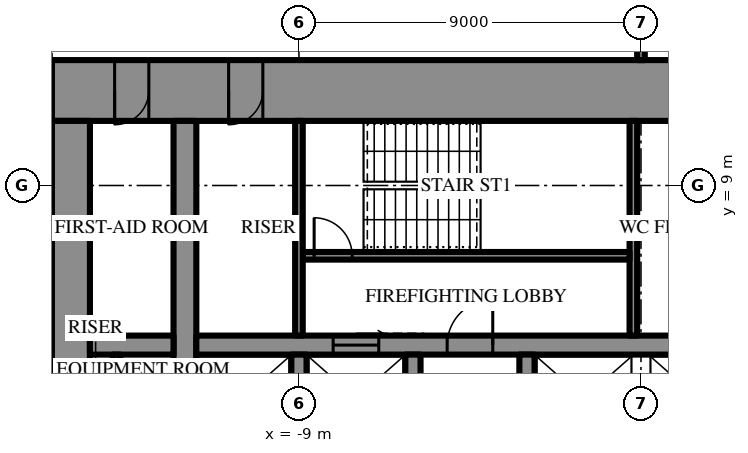
"""IFC4 building model, lengths in metres.
Left out: names, types, materials, properties, quantities, classifications, styles, units other than length and angle.
Written with IfcOpenShell. Run it as: python <this file> out.ifc"""

import sys

from ifc_helpers import new_model, si_unit, direction, frame, frame_2d, origin, place, context, subcontext, project, spatial, rectangle, extrude, element, fill, save


model = new_model("IFC4")
c1 = context("Model", 3, precision=1e-05, world=origin(), true_north=direction((0.0, 1.0)))
c2 = subcontext(c1, "Body", "Model", "MODEL_VIEW")
j1 = project(units=[si_unit("LENGTHUNIT", "METRE"), si_unit("PLANEANGLEUNIT", "RADIAN")], contexts=[c1])
p1 = place(None, origin())
s1 = spatial("IfcSite", under=j1, at=p1, CompositionType="ELEMENT")
p2 = place(p1, origin())
s2 = spatial("IfcBuilding", under=s1, at=p2, CompositionType="ELEMENT")
p3 = place(p2, frame((0.0, 0.0, 265.9)))
s3 = spatial("IfcBuildingStorey", under=s2, at=p3, CompositionType="ELEMENT", Elevation=265.9)
p4 = place(p3, frame((-15.5, 11.5, 0.0), z_axis=(0.0, 0.0, 1.0), x_axis=(1.0, 0.0, 0.0)))
e1 = element("IfcWall", 1, at=p4, inside=s3, PredefinedType="SHEAR", context=c2, shape_type="SweptSolid", body=[
    extrude(rectangle(XDim=31.0, YDim=1.6, at=frame_2d((15.5, 0.0))), origin(), (0.0, 0.0, 1.0), 4.2),
])
p5 = place(p4, frame((16.35, 0.0, 0.0)))
e2 = element("IfcOpeningElement", 2, at=p5, cuts=e1, PredefinedType="OPENING", context=c2, shape_type="SweptSolid", body=[
    extrude(rectangle(XDim=0.9, YDim=2.2, at=frame_2d((0.45, 1.1))), frame((0.0, 0.81, 0.0), z_axis=(0.0, -1.0, 0.0), x_axis=(1.0, 0.0, 0.0)), (0.0, 0.0, 1.0), 1.62),
])
p6 = place(p4, frame((19.35, 0.0, 0.0)))
e3 = element("IfcOpeningElement", 3, at=p6, cuts=e1, PredefinedType="OPENING", context=c2, shape_type="SweptSolid", body=[
    extrude(rectangle(XDim=0.9, YDim=2.2, at=frame_2d((0.45, 1.1))), frame((0.0, 0.81, 0.0), z_axis=(0.0, -1.0, 0.0), x_axis=(1.0, 0.0, 0.0)), (0.0, 0.0, 1.0), 1.62),
])
p7 = place(p4, frame((22.4, 0.0, 0.0)))
e4 = element("IfcOpeningElement", 4, at=p7, cuts=e1, PredefinedType="OPENING", context=c2, shape_type="SweptSolid", body=[
    extrude(rectangle(XDim=1.0, YDim=2.2, at=frame_2d((0.5, 1.1))), frame((0.0, 0.81, 0.0), z_axis=(0.0, -1.0, 0.0), x_axis=(1.0, 0.0, 0.0)), (0.0, 0.0, 1.0), 1.62),
])
p8 = place(p4, frame((1.65, 0.0, 0.0)))
e5 = element("IfcOpeningElement", 5, at=p8, cuts=e1, PredefinedType="OPENING", context=c2, shape_type="SweptSolid", body=[
    extrude(rectangle(XDim=0.9, YDim=2.2, at=frame_2d((0.45, 1.1))), frame((0.0, 0.81, 0.0), z_axis=(0.0, -1.0, 0.0), x_axis=(1.0, 0.0, 0.0)), (0.0, 0.0, 1.0), 1.62),
])
p9 = place(p4, frame((4.65, 0.0, 0.0)))
e6 = element("IfcOpeningElement", 6, at=p9, cuts=e1, PredefinedType="OPENING", context=c2, shape_type="SweptSolid", body=[
    extrude(rectangle(XDim=0.9, YDim=2.2, at=frame_2d((0.45, 1.1))), frame((0.0, 0.81, 0.0), z_axis=(0.0, -1.0, 0.0), x_axis=(1.0, 0.0, 0.0)), (0.0, 0.0, 1.0), 1.62),
])
p10 = place(p4, frame((25.45, 0.0, 0.0)))
e7 = element("IfcOpeningElement", 7, at=p10, cuts=e1, PredefinedType="OPENING", context=c2, shape_type="SweptSolid", body=[
    extrude(rectangle(XDim=0.9, YDim=2.2, at=frame_2d((0.45, 1.1))), frame((0.0, 0.81, 0.0), z_axis=(0.0, -1.0, 0.0), x_axis=(1.0, 0.0, 0.0)), (0.0, 0.0, 1.0), 1.62),
])
p11 = place(p4, frame((28.45, 0.0, 0.0)))
e8 = element("IfcOpeningElement", 8, at=p11, cuts=e1, PredefinedType="OPENING", context=c2, shape_type="SweptSolid", body=[
    extrude(rectangle(XDim=0.9, YDim=2.2, at=frame_2d((0.45, 1.1))), frame((0.0, 0.81, 0.0), z_axis=(0.0, -1.0, 0.0), x_axis=(1.0, 0.0, 0.0)), (0.0, 0.0, 1.0), 1.62),
])
p12 = place(p3, frame((-15.0, 10.7, 0.0), z_axis=(0.0, 0.0, 1.0), x_axis=(0.0, -1.0, 0.0)))
e9 = element("IfcWall", 9, at=p12, inside=s3, PredefinedType="SHEAR", context=c2, shape_type="SweptSolid", body=[
    extrude(rectangle(XDim=21.4, YDim=1.0, at=frame_2d((10.7, 0.0))), origin(), (0.0, 0.0, 1.0), 4.2),
])
p13 = place(p12, frame((9.8, 0.0, 0.0)))
e10 = element("IfcOpeningElement", 10, at=p13, cuts=e9, PredefinedType="OPENING", context=c2, shape_type="SweptSolid", body=[
    extrude(rectangle(XDim=1.8, YDim=2.4, at=frame_2d((0.9, 1.2))), frame((0.0, 0.51, 0.0), z_axis=(0.0, -1.0, 0.0), x_axis=(1.0, 0.0, 0.0)), (0.0, 0.0, 1.0), 1.02),
])
p14 = place(p3, frame((-12.0, -10.7, 0.0), z_axis=(0.0, 0.0, 1.0), x_axis=(0.0, 1.0, 0.0)))
e11 = element("IfcWall", 11, at=p14, inside=s3, PredefinedType="SHEAR", context=c2, shape_type="SweptSolid", body=[
    extrude(rectangle(XDim=21.4, YDim=0.6, at=frame_2d((10.7, 0.0))), origin(), (0.0, 0.0, 1.0), 4.2),
])
p15 = place(p14, frame((9.8, 0.0, 0.0)))
e12 = element("IfcOpeningElement", 12, at=p15, cuts=e11, PredefinedType="OPENING", context=c2, shape_type="SweptSolid", body=[
    extrude(rectangle(XDim=1.8, YDim=2.4, at=frame_2d((0.9, 1.2))), frame((0.0, 0.31, 0.0), z_axis=(0.0, -1.0, 0.0), x_axis=(1.0, 0.0, 0.0)), (0.0, 0.0, 1.0), 0.62),
])
p16 = place(p3, frame((-14.5, 4.8, 0.0), z_axis=(0.0, 0.0, 1.0), x_axis=(1.0, 0.0, 0.0)))
e13 = element("IfcWall", 13, at=p16, inside=s3, PredefinedType="SHEAR", context=c2, shape_type="SweptSolid", body=[
    extrude(rectangle(XDim=2.2, YDim=0.5, at=frame_2d((1.1, 0.0))), origin(), (0.0, 0.0, 1.0), 4.2),
])
p17 = place(p3, frame((-11.7, 4.8, 0.0), z_axis=(0.0, 0.0, 1.0), x_axis=(1.0, 0.0, 0.0)))
e14 = element("IfcWall", 14, at=p17, inside=s3, PredefinedType="SHEAR", context=c2, shape_type="SweptSolid", body=[
    extrude(rectangle(XDim=23.4, YDim=0.5, at=frame_2d((11.7, 0.0))), origin(), (0.0, 0.0, 1.0), 4.2),
])
p18 = place(p17, frame((6.6, 0.0, 0.0)))
e15 = element("IfcOpeningElement", 15, at=p18, cuts=e14, PredefinedType="OPENING", context=c2, shape_type="SweptSolid", body=[
    extrude(rectangle(XDim=1.2, YDim=2.2, at=frame_2d((0.6, 1.1))), frame((0.0, 0.26, 0.0), z_axis=(0.0, -1.0, 0.0), x_axis=(1.0, 0.0, 0.0)), (0.0, 0.0, 1.0), 0.52),
])
p19 = place(p17, frame((3.6, 0.0, 0.0)))
e16 = element("IfcOpeningElement", 16, at=p19, cuts=e14, PredefinedType="OPENING", context=c2, shape_type="SweptSolid", body=[
    extrude(rectangle(XDim=1.2, YDim=2.2, at=frame_2d((0.6, 1.1))), frame((0.0, 0.26, 0.0), z_axis=(0.0, -1.0, 0.0), x_axis=(1.0, 0.0, 0.0)), (0.0, 0.0, 1.0), 0.52),
])
for number, where, z_axis, x_axis in (
    (17, (-9.0, 2.25, 0.0), (0.0, 0.0, 1.0), (0.0, 1.0, 0.0)),
    (18, (-6.0, 2.25, 0.0), (0.0, 0.0, 1.0), (0.0, 1.0, 0.0)),
    (19, (-3.0, 2.25, 0.0), (0.0, 0.0, 1.0), (0.0, 1.0, 0.0)),
):
    element("IfcWall", number, at=place(p3, frame(where, z_axis=z_axis, x_axis=x_axis)), inside=s3, PredefinedType="SHEAR", context=c2, shape_type="SweptSolid", body=[
        extrude(rectangle(XDim=2.3, YDim=0.4, at=frame_2d((1.15, 0.0))), origin(), (0.0, 0.0, 1.0), 4.2),
    ])
p20 = place(p3, frame((-0.2, 5.05, 0.0), z_axis=(0.0, 0.0, 1.0), x_axis=(0.0, 1.0, 0.0)))
e20 = element("IfcWall", 20, at=p20, inside=s3, PredefinedType="SHEAR", context=c2, shape_type="SweptSolid", body=[
    extrude(rectangle(XDim=5.65, YDim=0.2, at=frame_2d((2.825, 0.0))), origin(), (0.0, 0.0, 1.0), 4.2),
])
p21 = place(p3, frame((-8.9, 7.15, 0.0), z_axis=(0.0, 0.0, 1.0), x_axis=(1.0, 0.0, 0.0)))
e21 = element("IfcWall", 21, at=p21, inside=s3, PredefinedType="SHEAR", context=c2, shape_type="SweptSolid", body=[
    extrude(rectangle(XDim=8.6, YDim=0.2, at=frame_2d((4.3, 0.0))), origin(), (0.0, 0.0, 1.0), 4.2),
])
p22 = place(p21, frame((0.3, 0.0, 0.0)))
e22 = element("IfcOpeningElement", 22, at=p22, cuts=e21, PredefinedType="OPENING", context=c2, shape_type="SweptSolid", body=[
    extrude(rectangle(XDim=1.0, YDim=2.2, at=frame_2d((0.5, 1.1))), frame((0.0, 0.11, 0.0), z_axis=(0.0, -1.0, 0.0), x_axis=(1.0, 0.0, 0.0)), (0.0, 0.0, 1.0), 0.22),
])
p23 = place(p3, frame((-9.0, 5.05, 0.0), z_axis=(0.0, 0.0, 1.0), x_axis=(0.0, 1.0, 0.0)))
e23 = element("IfcWall", 23, at=p23, inside=s3, PredefinedType="PARTITIONING", context=c2, shape_type="SweptSolid", body=[
    extrude(rectangle(XDim=5.65, YDim=0.2, at=frame_2d((2.825, 0.0))), origin(), (0.0, 0.0, 1.0), 4.0),
])
p24 = place(p3, frame((-13.8, 3.55, 0.0), z_axis=(0.0, 0.0, 1.0), x_axis=(0.0, 1.0, 0.0)))
e24 = element("IfcWall", 24, at=p24, inside=s3, PredefinedType="PARTITIONING", context=c2, shape_type="SweptSolid", body=[
    extrude(rectangle(XDim=1.0, YDim=0.2, at=frame_2d((0.5, 0.0))), origin(), (0.0, 0.0, 1.0), 4.0),
])
p25 = place(p3, frame((0.0, 12.3, 0.0), z_axis=(0.0, 0.0, 1.0), x_axis=(0.0, 1.0, 0.0)))
e25 = element("IfcWall", 25, at=p25, inside=s3, PredefinedType="PARTITIONING", context=c2, shape_type="SweptSolid", body=[
    extrude(rectangle(XDim=15.55, YDim=0.2, at=frame_2d((7.775, 0.0))), origin(), (0.0, 0.0, 1.0), 2.992),
])
p26 = place(p25, frame((1.055, 0.0, 0.0)))
e26 = element("IfcOpeningElement", 26, at=p26, cuts=e25, PredefinedType="OPENING", context=c2, shape_type="SweptSolid", body=[
    extrude(rectangle(XDim=1.0, YDim=2.2, at=frame_2d((0.5, 1.1))), frame((0.0, 0.11, 0.0), z_axis=(0.0, -1.0, 0.0), x_axis=(1.0, 0.0, 0.0)), (0.0, 0.0, 1.0), 0.22),
])
p27 = place(p18, origin())
e27 = element("IfcDoor", 27, at=p27, inside=s3, OperationType="SINGLE_SWING_LEFT", PredefinedType="DOOR", context=c2, shape_type="SweptSolid", body=[
    extrude(rectangle(XDim=1.2, YDim=2.2, at=frame_2d((0.6, 1.1))), frame((0.0, 0.025, 0.0), z_axis=(0.0, -1.0, 0.0), x_axis=(1.0, 0.0, 0.0)), (0.0, 0.0, 1.0), 0.05),
])
fill(e15, e27)
p28 = place(p22, origin())
e28 = element("IfcDoor", 28, at=p28, inside=s3, OperationType="SINGLE_SWING_RIGHT", PredefinedType="DOOR", context=c2, shape_type="SweptSolid", body=[
    extrude(rectangle(XDim=1.0, YDim=2.2, at=frame_2d((0.5, 1.1))), frame((0.0, 0.025, 0.0), z_axis=(0.0, -1.0, 0.0), x_axis=(1.0, 0.0, 0.0)), (0.0, 0.0, 1.0), 0.05),
])
fill(e22, e28)
p29 = place(p8, frame((0.9, 0.0, 0.0), z_axis=(0.0, 0.0, 1.0), x_axis=(-1.0, 0.0, 0.0)))
e29 = element("IfcDoor", 29, at=p29, inside=s3, OperationType="SINGLE_SWING_LEFT", PredefinedType="DOOR", context=c2, shape_type="SweptSolid", body=[
    extrude(rectangle(XDim=0.9, YDim=2.2, at=frame_2d((0.45, 1.1))), frame((0.0, 0.025, 0.0), z_axis=(0.0, -1.0, 0.0), x_axis=(1.0, 0.0, 0.0)), (0.0, 0.0, 1.0), 0.05),
])
fill(e5, e29)
p30 = place(p9, frame((0.9, 0.0, 0.0), z_axis=(0.0, 0.0, 1.0), x_axis=(-1.0, 0.0, 0.0)))
e30 = element("IfcDoor", 30, at=p30, inside=s3, OperationType="SINGLE_SWING_LEFT", PredefinedType="DOOR", context=c2, shape_type="SweptSolid", body=[
    extrude(rectangle(XDim=0.9, YDim=2.2, at=frame_2d((0.45, 1.1))), frame((0.0, 0.025, 0.0), z_axis=(0.0, -1.0, 0.0), x_axis=(1.0, 0.0, 0.0)), (0.0, 0.0, 1.0), 0.05),
])
fill(e6, e30)
p31 = place(p19, origin())
e31 = element("IfcDoor", 31, at=p31, inside=s3, OperationType="SLIDING_TO_LEFT", PredefinedType="DOOR", context=c2, shape_type="SweptSolid", body=[
    extrude(rectangle(XDim=1.2, YDim=2.2, at=frame_2d((0.6, 1.1))), frame((0.0, 0.025, 0.0), z_axis=(0.0, -1.0, 0.0), x_axis=(1.0, 0.0, 0.0)), (0.0, 0.0, 1.0), 0.05),
])
fill(e16, e31)
save(model, sys.argv[1])
